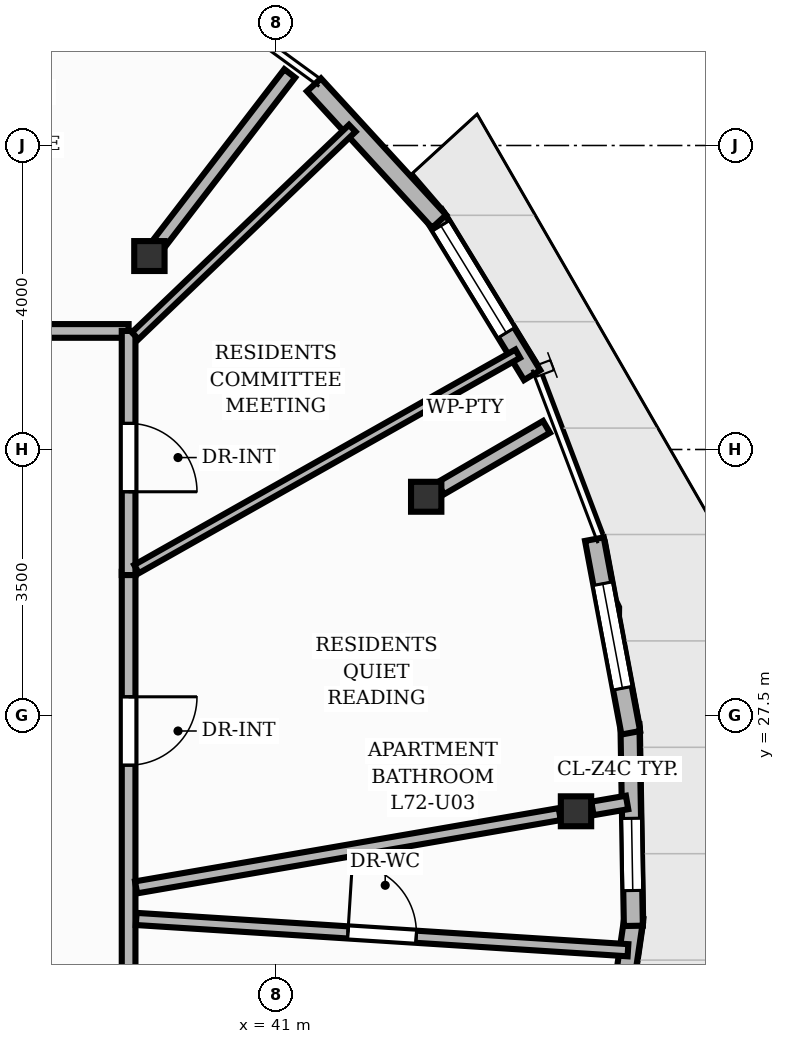
"""IFC4 building model, lengths in metres.
Left out: names, types, materials, properties, quantities, classifications, styles, units other than length and angle.
Written with IfcOpenShell. Run it as: python <this file> out.ifc"""

import sys

from ifc_helpers import new_model, si_unit, direction, frame, frame_2d, origin, origin_2d, place, context, subcontext, project, spatial, rectangle, i_section, extrude, element, fill, save


model = new_model("IFC4")
c1 = context("Model", 3, precision=1e-05, world=origin(), true_north=direction((0.0, 1.0)))
c2 = subcontext(c1, "Body", "Model", "MODEL_VIEW")
j1 = project(units=[si_unit("LENGTHUNIT", "METRE"), si_unit("PLANEANGLEUNIT", "RADIAN")], contexts=[c1])
p1 = place(None, origin())
s1 = spatial("IfcSite", under=j1, at=p1, CompositionType="ELEMENT")
p2 = place(p1, origin())
s2 = spatial("IfcBuilding", under=s1, at=p2, CompositionType="ELEMENT")
p3 = place(p2, frame((0.0, 0.0, 239.84)))
s3 = spatial("IfcBuildingStorey", under=s2, at=p3, CompositionType="ELEMENT", Elevation=239.84)
for number, where, z_axis, x_axis in (
    (1, (44.946, 26.24, 0.0), (0.0, 0.0, 1.0), (1.0, 0.0, 0.0)),
    (2, (42.975, 30.378, 0.0), (0.0, 0.0, 1.0), (1.0, 0.0, 0.0)),
    (3, (39.333, 33.545, 0.0), (0.0, 0.0, 1.0), (1.0, 0.0, 0.0)),
):
    element("IfcColumn", number, at=place(p3, frame(where, z_axis=z_axis, x_axis=x_axis)), inside=s3, PredefinedType="COLUMN", context=c2, shape_type="SweptSolid", body=[
        extrude(i_section(OverallWidth=0.399, OverallDepth=0.394, WebThickness=0.023, FlangeThickness=0.037, at=origin_2d()), origin(), (0.0, 0.0, 1.0), 3.2),
    ])
p4 = place(p3, frame((45.708, 24.842, 0.0), z_axis=(0.0, 0.0, 1.0), x_axis=(-0.144229466115, -0.989544269401, 0.0)))
e4 = element("IfcWall", 4, at=p4, inside=s3, PredefinedType="SOLIDWALL", context=c2, shape_type="SweptSolid", body=[
    extrude(rectangle(XDim=2.702, YDim=0.25, at=frame_2d((1.351, 0.0))), origin(), (0.0, 0.0, 1.0), 2.497),
])
p5 = place(p4, frame((0.651, 0.0, 0.85)))
e5 = element("IfcOpeningElement", 5, at=p5, cuts=e4, PredefinedType="OPENING", context=c2, shape_type="SweptSolid", body=[
    extrude(rectangle(XDim=1.4, YDim=1.55, at=frame_2d((0.7, 0.775))), frame((0.0, 0.135, 0.0), z_axis=(0.0, -1.0, 0.0), x_axis=(1.0, 0.0, 0.0)), (0.0, 0.0, 1.0), 0.27),
])
p6 = place(p3, frame((45.656, 27.383, 0.0), z_axis=(0.0, 0.0, 1.0), x_axis=(0.016945158089, -0.999856420501, 0.0)))
e6 = element("IfcWall", 6, at=p6, inside=s3, PredefinedType="SOLIDWALL", context=c2, shape_type="SweptSolid", body=[
    extrude(rectangle(XDim=2.651, YDim=0.25, at=frame_2d((1.326, 0.0))), origin(), (0.0, 0.0, 1.0), 2.88),
])
p7 = place(p6, frame((1.236, 0.0, 0.85)))
e7 = element("IfcOpeningElement", 7, at=p7, cuts=e6, PredefinedType="OPENING", context=c2, shape_type="SweptSolid", body=[
    extrude(rectangle(XDim=0.95, YDim=1.44, at=frame_2d((0.475, 0.72))), frame((0.0, 0.135, 0.0), z_axis=(0.0, -1.0, 0.0), x_axis=(1.0, 0.0, 0.0)), (0.0, 0.0, 1.0), 0.27),
])
p8 = place(p3, frame((45.188, 29.82, 0.0), z_axis=(0.0, 0.0, 1.0), x_axis=(0.184783228791, -0.982779302976, 0.0)))
e8 = element("IfcWall", 8, at=p8, inside=s3, PredefinedType="SOLIDWALL", context=c2, shape_type="SweptSolid", body=[
    extrude(rectangle(XDim=2.592, YDim=0.25, at=frame_2d((1.296, 0.0))), origin(), (0.0, 0.0, 1.0), 2.88),
])
p9 = place(p8, frame((0.596, 0.0, 0.85)))
e9 = element("IfcOpeningElement", 9, at=p9, cuts=e8, PredefinedType="OPENING", context=c2, shape_type="SweptSolid", body=[
    extrude(rectangle(XDim=1.4, YDim=1.55, at=frame_2d((0.7, 0.775))), frame((0.0, 0.135, 0.0), z_axis=(0.0, -1.0, 0.0), x_axis=(1.0, 0.0, 0.0)), (0.0, 0.0, 1.0), 0.27),
])
p10 = place(p3, frame((43.077, 34.093, 0.0), z_axis=(0.0, 0.0, 1.0), x_axis=(0.52150580366, -0.853247734687, 0.0)))
e10 = element("IfcWall", 10, at=p10, inside=s3, PredefinedType="SOLIDWALL", context=c2, shape_type="SweptSolid", body=[
    extrude(rectangle(XDim=2.478, YDim=0.25, at=frame_2d((1.239, 0.0))), origin(), (0.0, 0.0, 1.0), 2.88),
])
p11 = place(p10, frame((0.175, 0.0, 0.85)))
e11 = element("IfcOpeningElement", 11, at=p11, cuts=e10, PredefinedType="OPENING", context=c2, shape_type="SweptSolid", body=[
    extrude(rectangle(XDim=1.65, YDim=1.55, at=frame_2d((0.825, 0.775))), frame((0.0, 0.135, 0.0), z_axis=(0.0, -1.0, 0.0), x_axis=(1.0, 0.0, 0.0)), (0.0, 0.0, 1.0), 0.27),
])
p12 = place(p3, frame((41.499, 35.798, 0.0), z_axis=(0.0, 0.0, 1.0), x_axis=(0.675783606308, -0.737100072884, 0.0)))
e12 = element("IfcWall", 12, at=p12, inside=s3, PredefinedType="SOLIDWALL", context=c2, shape_type="SweptSolid", body=[
    extrude(rectangle(XDim=2.437, YDim=0.25, at=frame_2d((1.218, 0.0))), origin(), (0.0, 0.0, 1.0), 2.88),
])
p13 = place(p3, frame((45.163, 26.277, 0.0), z_axis=(0.0, 0.0, 1.0), x_axis=(0.985450971837, 0.169959942652, 0.0)))
e13 = element("IfcWall", 13, at=p13, inside=s3, PredefinedType="PARTITIONING", context=c2, shape_type="SweptSolid", body=[
    extrude(rectangle(XDim=0.463, YDim=0.18, at=frame_2d((0.231, 0.0))), origin(), (0.0, 0.0, 1.0), 2.323),
])
p14 = place(p3, frame((43.165, 30.488, 0.0), z_axis=(0.0, 0.0, 1.0), x_axis=(0.864591417654, 0.50247555216, 0.0)))
e14 = element("IfcWall", 14, at=p14, inside=s3, PredefinedType="PARTITIONING", context=c2, shape_type="SweptSolid", body=[
    extrude(rectangle(XDim=1.611, YDim=0.18, at=frame_2d((0.805, 0.0))), origin(), (0.0, 0.0, 1.0), 2.875),
])
p15 = place(p3, frame((39.467, 33.719, 0.0), z_axis=(0.0, 0.0, 1.0), x_axis=(0.609215330611, 0.793004842954, 0.0)))
e15 = element("IfcWall", 15, at=p15, inside=s3, PredefinedType="PARTITIONING", context=c2, shape_type="SweptSolid", body=[
    extrude(rectangle(XDim=2.811, YDim=0.18, at=frame_2d((1.405, 0.0))), origin(), (0.0, 0.0, 1.0), 2.238),
])
p16 = place(p3, frame((39.06, 29.391, 0.0), z_axis=(0.0, 0.0, 1.0), x_axis=(0.0, -1.0, 0.0)))
e16 = element("IfcWall", 16, at=p16, inside=s3, PredefinedType="PARTITIONING", context=c2, shape_type="SweptSolid", body=[
    extrude(rectangle(XDim=13.951, YDim=0.18, at=frame_2d((6.975, 0.0))), origin(), (0.0, 0.0, 1.0), 2.875),
])
p17 = place(p16, frame((5.593, 0.0, 0.0)))
e17 = element("IfcOpeningElement", 17, at=p17, cuts=e16, PredefinedType="OPENING", context=c2, shape_type="SweptSolid", body=[
    extrude(rectangle(XDim=1.05, YDim=2.15, at=frame_2d((0.525, 1.075))), frame((0.0, 0.1, 0.0), z_axis=(0.0, -1.0, 0.0), x_axis=(1.0, 0.0, 0.0)), (0.0, 0.0, 1.0), 0.2),
])
p18 = place(p16, frame((1.645, 0.0, 0.0)))
e18 = element("IfcOpeningElement", 18, at=p18, cuts=e16, PredefinedType="OPENING", context=c2, shape_type="SweptSolid", body=[
    extrude(rectangle(XDim=0.9, YDim=2.1, at=frame_2d((0.45, 1.05))), frame((0.0, 0.1, 0.0), z_axis=(0.0, -1.0, 0.0), x_axis=(1.0, 0.0, 0.0)), (0.0, 0.0, 1.0), 0.2),
])
p19 = place(p3, frame((30.572, 32.56, 0.0), z_axis=(0.0, 0.0, 1.0), x_axis=(1.0, 0.0, 0.0)))
e19 = element("IfcWall", 19, at=p19, inside=s3, PredefinedType="PARTITIONING", context=c2, shape_type="SweptSolid", body=[
    extrude(rectangle(XDim=8.489, YDim=0.18, at=frame_2d((4.244, 0.0))), origin(), (0.0, 0.0, 1.0), 2.238),
])
p20 = place(p19, frame((5.477, 0.0, 0.0)))
e20 = element("IfcOpeningElement", 20, at=p20, cuts=e19, PredefinedType="OPENING", context=c2, shape_type="SweptSolid", body=[
    extrude(rectangle(XDim=0.9, YDim=2.1, at=frame_2d((0.45, 1.05))), frame((0.0, 0.1, 0.0), z_axis=(0.0, -1.0, 0.0), x_axis=(1.0, 0.0, 0.0)), (0.0, 0.0, 1.0), 0.2),
])
p21 = place(p3, frame((39.06, 32.56, 0.0), z_axis=(0.0, 0.0, 1.0), x_axis=(0.0, -1.0, 0.0)))
e21 = element("IfcWall", 21, at=p21, inside=s3, PredefinedType="PARTITIONING", context=c2, shape_type="SweptSolid", body=[
    extrude(rectangle(XDim=3.212, YDim=0.18, at=frame_2d((1.606, 0.0))), origin(), (0.0, 0.0, 1.0), 2.875),
])
p22 = place(p21, frame((1.216, 0.0, 0.0)))
e22 = element("IfcOpeningElement", 22, at=p22, cuts=e21, PredefinedType="OPENING", context=c2, shape_type="SweptSolid", body=[
    extrude(rectangle(XDim=0.9, YDim=2.1, at=frame_2d((0.45, 1.05))), frame((0.0, 0.1, 0.0), z_axis=(0.0, -1.0, 0.0), x_axis=(1.0, 0.0, 0.0)), (0.0, 0.0, 1.0), 0.2),
])
p23 = place(p3, frame((39.16, 24.823, 0.0), z_axis=(0.0, 0.0, 1.0), x_axis=(0.997982507088, -0.063489491621, 0.0)))
e23 = element("IfcWall", 23, at=p23, inside=s3, PredefinedType="PLUMBINGWALL", context=c2, shape_type="SweptSolid", body=[
    extrude(rectangle(XDim=6.483, YDim=0.16, at=frame_2d((3.242, 0.0))), origin(), (0.0, 0.0, 1.0), 2.612),
])
p24 = place(p23, frame((2.792, 0.0, 0.0)))
e24 = element("IfcOpeningElement", 24, at=p24, cuts=e23, PredefinedType="OPENING", context=c2, shape_type="SweptSolid", body=[
    extrude(rectangle(XDim=0.9, YDim=2.1, at=frame_2d((0.45, 1.05))), frame((0.0, 0.09, 0.0), z_axis=(0.0, -1.0, 0.0), x_axis=(1.0, 0.0, 0.0)), (0.0, 0.0, 1.0), 0.18),
])
p25 = place(p3, frame((39.158, 25.238, 0.0), z_axis=(0.0, 0.0, 1.0), x_axis=(0.985360267717, 0.170485022229, 0.0)))
e25 = element("IfcWall", 25, at=p25, inside=s3, PredefinedType="PLUMBINGWALL", context=c2, shape_type="SweptSolid", body=[
    extrude(rectangle(XDim=5.656, YDim=0.16, at=frame_2d((2.828, 0.0))), origin(), (0.0, 0.0, 1.0), 2.323),
])
p26 = place(p3, frame((42.002, 35.226, 0.0), z_axis=(0.0, 0.0, 1.0), x_axis=(-0.722686135134, -0.691176352377, 0.0)))
e26 = element("IfcWall", 26, at=p26, inside=s3, PredefinedType="PARTITIONING", context=c2, shape_type="SweptSolid", body=[
    extrude(rectangle(XDim=3.951, YDim=0.125, at=frame_2d((1.976, 0.0))), origin(), (0.0, 0.0, 1.0), 2.238),
])
p27 = place(p3, frame((44.179, 32.26, 0.0), z_axis=(0.0, 0.0, 1.0), x_axis=(-0.870609410892, -0.491974850644, 0.0)))
e27 = element("IfcWall", 27, at=p27, inside=s3, PredefinedType="PARTITIONING", context=c2, shape_type="SweptSolid", body=[
    extrude(rectangle(XDim=5.76, YDim=0.125, at=frame_2d((2.88, 0.0))), origin(), (0.0, 0.0, 1.0), 2.875),
])
p28 = place(p7, origin())
e28 = element("IfcWindow", 28, at=p28, inside=s3, PartitioningType="SINGLE_PANEL", PredefinedType="WINDOW", context=c2, shape_type="SweptSolid", body=[
    extrude(rectangle(XDim=0.95, YDim=1.44, at=frame_2d((0.475, 0.72))), frame((0.0, 0.03, 0.0), z_axis=(0.0, -1.0, 0.0), x_axis=(1.0, 0.0, 0.0)), (0.0, 0.0, 1.0), 0.06),
])
fill(e7, e28)
p29 = place(p9, origin())
e29 = element("IfcWindow", 29, at=p29, inside=s3, PartitioningType="SINGLE_PANEL", PredefinedType="WINDOW", context=c2, shape_type="SweptSolid", body=[
    extrude(rectangle(XDim=1.4, YDim=1.55, at=frame_2d((0.7, 0.775))), frame((0.0, 0.03, 0.0), z_axis=(0.0, -1.0, 0.0), x_axis=(1.0, 0.0, 0.0)), (0.0, 0.0, 1.0), 0.06),
])
fill(e9, e29)
p30 = place(p11, origin())
e30 = element("IfcWindow", 30, at=p30, inside=s3, PartitioningType="SINGLE_PANEL", PredefinedType="WINDOW", context=c2, shape_type="SweptSolid", body=[
    extrude(rectangle(XDim=1.65, YDim=1.55, at=frame_2d((0.825, 0.775))), frame((0.0, 0.03, 0.0), z_axis=(0.0, -1.0, 0.0), x_axis=(1.0, 0.0, 0.0)), (0.0, 0.0, 1.0), 0.06),
])
fill(e11, e30)
p31 = place(p24, origin())
e31 = element("IfcDoor", 31, at=p31, inside=s3, OperationType="SINGLE_SWING_LEFT", PredefinedType="DOOR", context=c2, shape_type="SweptSolid", body=[
    extrude(rectangle(XDim=0.9, YDim=2.1, at=frame_2d((0.45, 1.05))), frame((0.0, 0.025, 0.0), z_axis=(0.0, -1.0, 0.0), x_axis=(1.0, 0.0, 0.0)), (0.0, 0.0, 1.0), 0.05),
])
fill(e24, e31)
p32 = place(p22, origin())
e32 = element("IfcDoor", 32, at=p32, inside=s3, OperationType="SINGLE_SWING_RIGHT", PredefinedType="DOOR", context=c2, shape_type="SweptSolid", body=[
    extrude(rectangle(XDim=0.9, YDim=2.1, at=frame_2d((0.45, 1.05))), frame((0.0, 0.025, 0.0), z_axis=(0.0, -1.0, 0.0), x_axis=(1.0, 0.0, 0.0)), (0.0, 0.0, 1.0), 0.05),
])
fill(e22, e32)
p33 = place(p18, origin())
e33 = element("IfcDoor", 33, at=p33, inside=s3, OperationType="SINGLE_SWING_LEFT", PredefinedType="DOOR", context=c2, shape_type="SweptSolid", body=[
    extrude(rectangle(XDim=0.9, YDim=2.1, at=frame_2d((0.45, 1.05))), frame((0.0, 0.025, 0.0), z_axis=(0.0, -1.0, 0.0), x_axis=(1.0, 0.0, 0.0)), (0.0, 0.0, 1.0), 0.05),
])
fill(e18, e33)
save(model, sys.argv[1])
